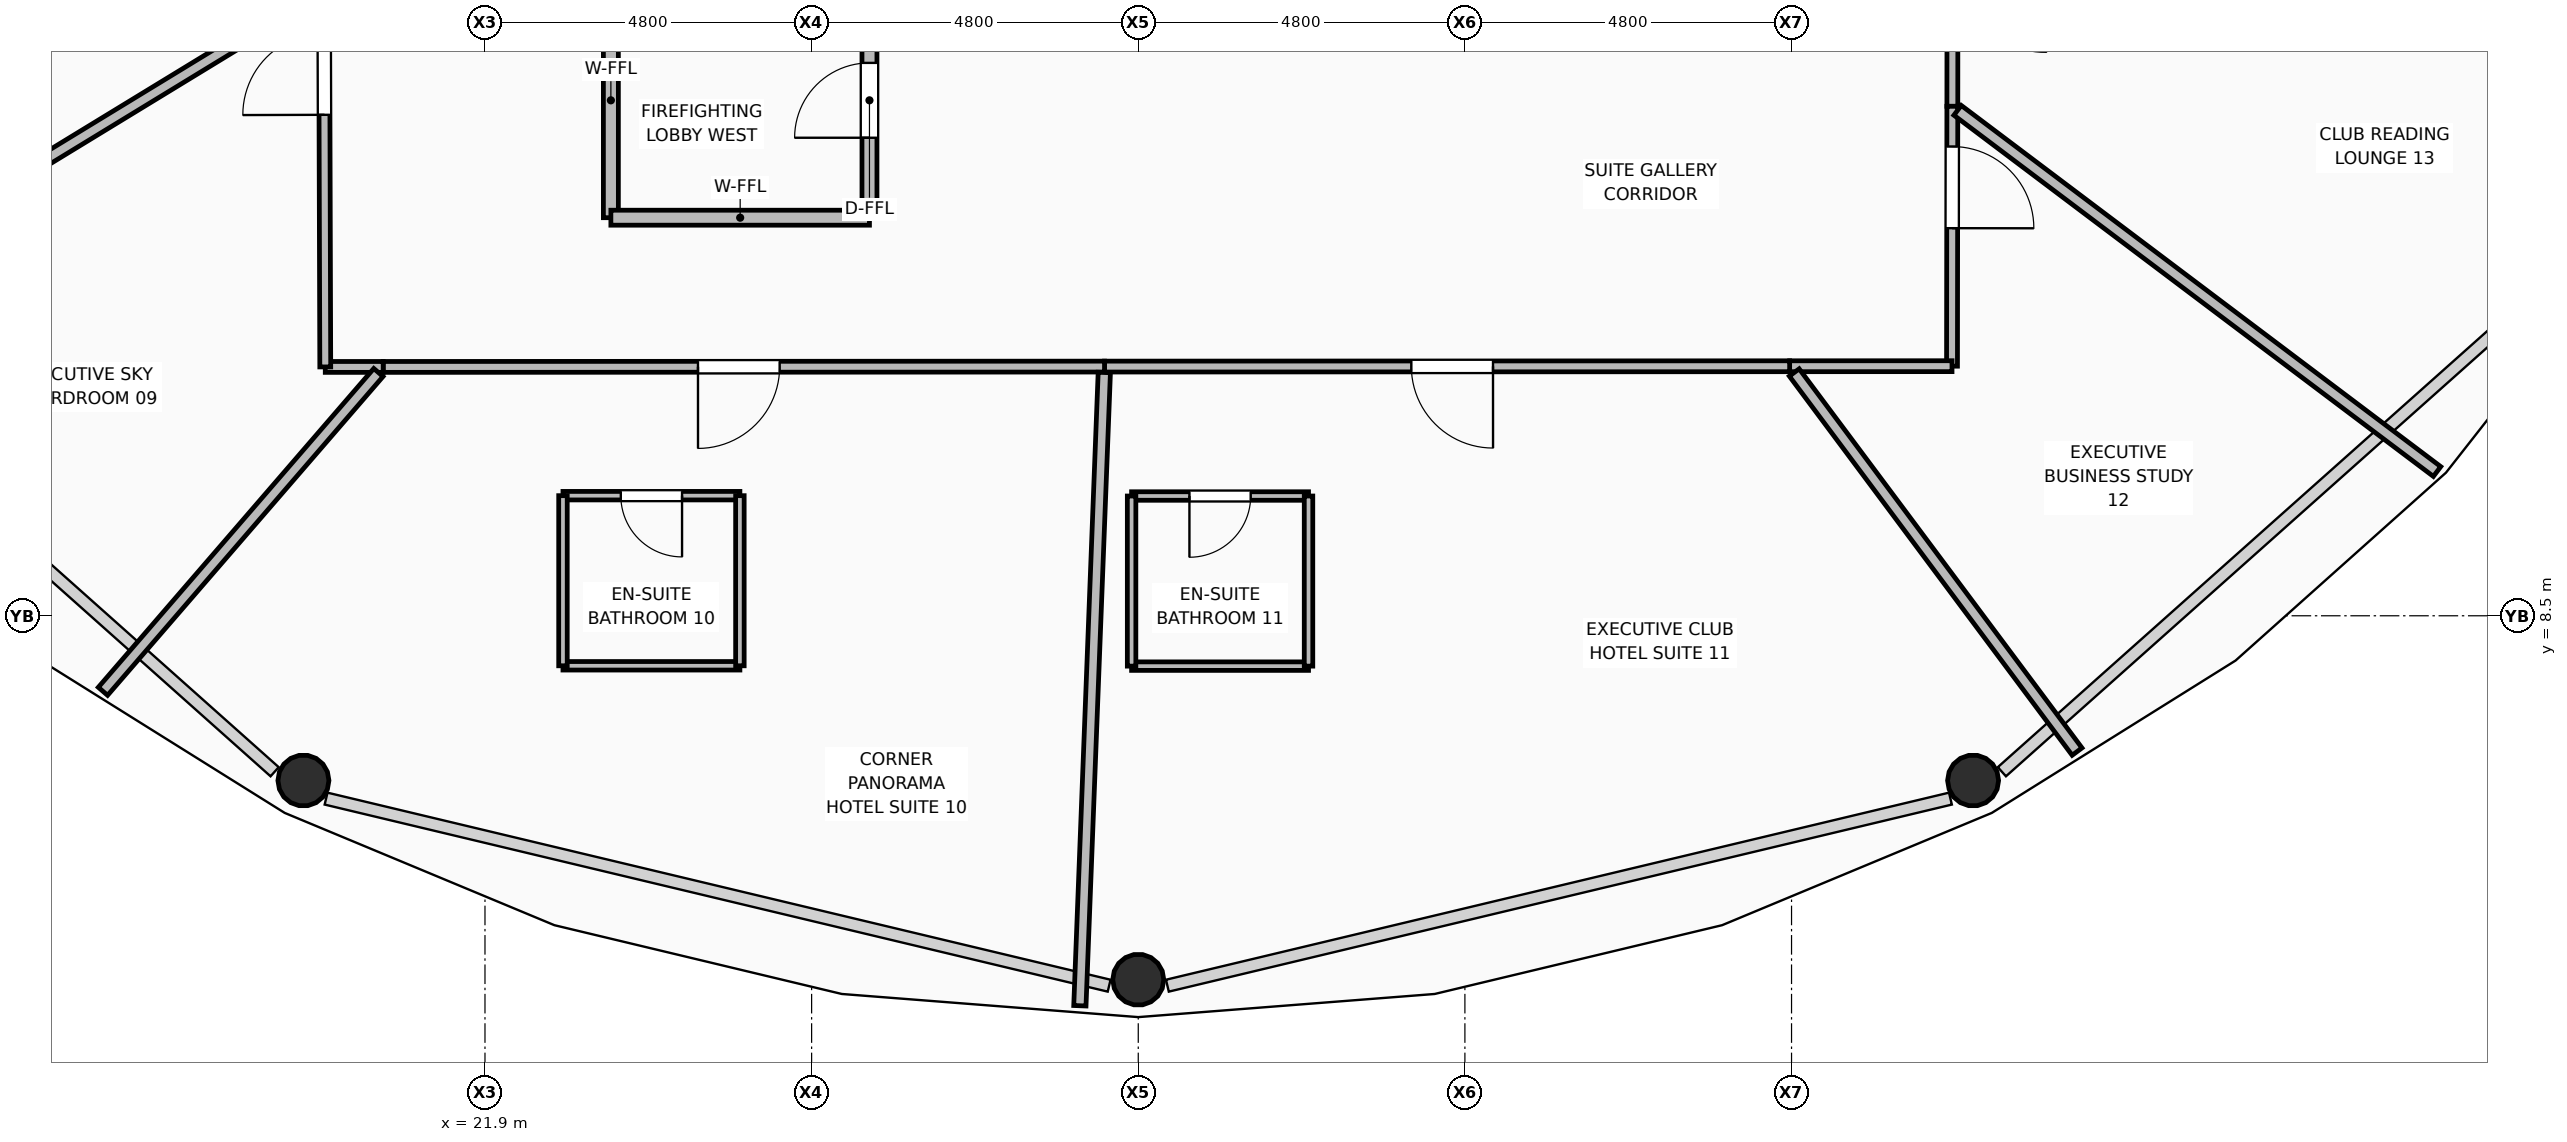
"""IFC4 building model, lengths in metres.
Left out: names, types, materials, properties, quantities, classifications, styles, units other than length and angle.
Written with IfcOpenShell. Run it as: python <this file> out.ifc"""

import sys

from ifc_helpers import new_model, si_unit, direction, frame, frame_2d, origin, origin_2d, place, context, subcontext, project, spatial, rectangle, hollow_circle, extrude, element, fill, save


model = new_model("IFC4")
c1 = context("Model", 3, precision=1e-05, world=origin(), true_north=direction((0.0, 1.0)))
c2 = subcontext(c1, "Body", "Model", "MODEL_VIEW")
j1 = project(units=[si_unit("LENGTHUNIT", "METRE"), si_unit("PLANEANGLEUNIT", "RADIAN")], contexts=[c1])
p1 = place(None, origin())
s1 = spatial("IfcSite", under=j1, at=p1, CompositionType="ELEMENT")
p2 = place(p1, origin())
s2 = spatial("IfcBuilding", under=s1, at=p2, CompositionType="ELEMENT")
p3 = place(p2, frame((0.0, 0.0, 168.45)))
s3 = spatial("IfcBuildingStorey", under=s2, at=p3, CompositionType="ELEMENT", Elevation=168.45)
for number, where, z_axis, x_axis in (
    (1, (19.232, 6.079, 0.0), (0.0, 0.0, 1.0), (1.0, 0.0, 0.0)),
    (2, (31.5, 3.152, 0.0), (0.0, 0.0, 1.0), (1.0, 0.0, 0.0)),
    (3, (43.768, 6.079, 0.0), (0.0, 0.0, 1.0), (1.0, 0.0, 0.0)),
):
    element("IfcColumn", number, at=place(p3, frame(where, z_axis=z_axis, x_axis=x_axis)), inside=s3, PredefinedType="COLUMN", context=c2, shape_type="SweptSolid", body=[
        extrude(hollow_circle(Radius=0.375, WallThickness=0.035, at=origin_2d()), origin(), (0.0, 0.0, 1.0), 3.57),
    ])
p4 = place(p3, frame((23.75, 14.35, 0.0), z_axis=(0.0, 0.0, 1.0), x_axis=(0.0, 1.0, 0.0)))
e4 = element("IfcWall", 4, at=p4, inside=s3, PredefinedType="PARTITIONING", context=c2, shape_type="SweptSolid", body=[
    extrude(rectangle(XDim=3.45, YDim=0.22, at=frame_2d((1.725, 0.0))), origin(), (0.0, 0.0, 1.0), 3.006),
])
p5 = place(p3, frame((23.75, 14.35, 0.0), z_axis=(0.0, 0.0, 1.0), x_axis=(1.0, 0.0, 0.0)))
e5 = element("IfcWall", 5, at=p5, inside=s3, PredefinedType="PARTITIONING", context=c2, shape_type="SweptSolid", body=[
    extrude(rectangle(XDim=3.8, YDim=0.22, at=frame_2d((1.9, 0.0))), origin(), (0.0, 0.0, 1.0), 3.55),
])
p6 = place(p3, frame((27.55, 14.35, 0.0), z_axis=(0.0, 0.0, 1.0), x_axis=(0.0, 1.0, 0.0)))
e6 = element("IfcWall", 6, at=p6, inside=s3, PredefinedType="PARTITIONING", context=c2, shape_type="SweptSolid", body=[
    extrude(rectangle(XDim=3.45, YDim=0.22, at=frame_2d((1.725, 0.0))), origin(), (0.0, 0.0, 1.0), 3.006),
])
p7 = place(p6, frame((1.175, 0.0, 0.0)))
e7 = element("IfcOpeningElement", 7, at=p7, cuts=e6, PredefinedType="OPENING", context=c2, shape_type="SweptSolid", body=[
    extrude(rectangle(XDim=1.1, YDim=2.1, at=frame_2d((0.55, 1.05))), frame((0.0, 0.12, 0.0), z_axis=(0.0, -1.0, 0.0), x_axis=(1.0, 0.0, 0.0)), (0.0, 0.0, 1.0), 0.24),
])
p8 = place(p3, frame((43.465, 17.96, 0.0), z_axis=(0.0, 0.0, 1.0), x_axis=(-0.001113722858, -0.999999379811, 0.0)))
e8 = element("IfcWall", 8, at=p8, inside=s3, PredefinedType="PARTITIONING", context=c2, shape_type="SweptSolid", body=[
    extrude(rectangle(XDim=1.973, YDim=0.16, at=frame_2d((0.986, 0.0))), origin(), (0.0, 0.0, 1.0), 3.006),
])
p9 = place(p3, frame((43.463, 15.987, 0.0), z_axis=(0.0, 0.0, 1.0), x_axis=(-0.001278526092, -0.999999182685, 0.0)))
e9 = element("IfcWall", 9, at=p9, inside=s3, PredefinedType="PARTITIONING", context=c2, shape_type="SweptSolid", body=[
    extrude(rectangle(XDim=3.819, YDim=0.16, at=frame_2d((1.91, 0.0))), origin(), (0.0, 0.0, 1.0), 3.55),
])
p10 = place(p9, frame((0.591, 0.0, 0.0)))
e10 = element("IfcOpeningElement", 10, at=p10, cuts=e9, PredefinedType="OPENING", context=c2, shape_type="SweptSolid", body=[
    extrude(rectangle(XDim=1.2, YDim=2.1, at=frame_2d((0.6, 1.05))), frame((0.0, 0.09, 0.0), z_axis=(0.0, -1.0, 0.0), x_axis=(1.0, 0.0, 0.0)), (0.0, 0.0, 1.0), 0.18),
])
p11 = place(p3, frame((43.458, 12.168, 0.0), z_axis=(0.0, 0.0, 1.0), x_axis=(-0.99999991624, -0.000409290869, 0.0)))
e11 = element("IfcWall", 11, at=p11, inside=s3, PredefinedType="PARTITIONING", context=c2, shape_type="SweptSolid", body=[
    extrude(rectangle(XDim=2.386, YDim=0.16, at=frame_2d((1.193, 0.0))), origin(), (0.0, 0.0, 1.0), 3.006),
])
p12 = place(p3, frame((41.072, 12.167, 0.0), z_axis=(0.0, 0.0, 1.0), x_axis=(-0.999999882398, -0.000484977755, 0.0)))
e12 = element("IfcWall", 12, at=p12, inside=s3, PredefinedType="PARTITIONING", context=c2, shape_type="SweptSolid", body=[
    extrude(rectangle(XDim=10.068, YDim=0.16, at=frame_2d((5.034, 0.0))), origin(), (0.0, 0.0, 1.0), 3.006),
])
p13 = place(p12, frame((4.359, 0.0, 0.0)))
e13 = element("IfcOpeningElement", 13, at=p13, cuts=e12, PredefinedType="OPENING", context=c2, shape_type="SweptSolid", body=[
    extrude(rectangle(XDim=1.2, YDim=2.1, at=frame_2d((0.6, 1.05))), frame((0.0, 0.09, 0.0), z_axis=(0.0, -1.0, 0.0), x_axis=(1.0, 0.0, 0.0)), (0.0, 0.0, 1.0), 0.18),
])
p14 = place(p3, frame((31.004, 12.162, 0.0), z_axis=(0.0, 0.0, 1.0), x_axis=(-0.999999883026, -0.000483681451, 0.0)))
e14 = element("IfcWall", 14, at=p14, inside=s3, PredefinedType="PARTITIONING", context=c2, shape_type="SweptSolid", body=[
    extrude(rectangle(XDim=10.6, YDim=0.16, at=frame_2d((5.3, 0.0))), origin(), (0.0, 0.0, 1.0), 3.006),
])
p15 = place(p14, frame((4.774, 0.0, 0.0)))
e15 = element("IfcOpeningElement", 15, at=p15, cuts=e14, PredefinedType="OPENING", context=c2, shape_type="SweptSolid", body=[
    extrude(rectangle(XDim=1.2, YDim=2.1, at=frame_2d((0.6, 1.05))), frame((0.0, 0.09, 0.0), z_axis=(0.0, -1.0, 0.0), x_axis=(1.0, 0.0, 0.0)), (0.0, 0.0, 1.0), 0.18),
])
p16 = place(p3, frame((20.404, 12.157, 0.0), z_axis=(0.0, 0.0, 1.0), x_axis=(-1.0, 0.0, 0.0)))
e16 = element("IfcWall", 16, at=p16, inside=s3, PredefinedType="PARTITIONING", context=c2, shape_type="SweptSolid", body=[
    extrude(rectangle(XDim=0.851, YDim=0.16, at=frame_2d((0.426, 0.0))), origin(), (0.0, 0.0, 1.0), 3.006),
])
p17 = place(p3, frame((19.553, 12.157, 0.0), z_axis=(0.0, 0.0, 1.0), x_axis=(-0.003113283747, 0.99999515372, 0.0)))
e17 = element("IfcWall", 17, at=p17, inside=s3, PredefinedType="PARTITIONING", context=c2, shape_type="SweptSolid", body=[
    extrude(rectangle(XDim=5.803, YDim=0.16, at=frame_2d((2.901, 0.0))), origin(), (0.0, 0.0, 1.0), 3.006),
])
p18 = place(p17, frame((3.705, 0.0, 0.0)))
e18 = element("IfcOpeningElement", 18, at=p18, cuts=e17, PredefinedType="OPENING", context=c2, shape_type="SweptSolid", body=[
    extrude(rectangle(XDim=1.2, YDim=2.1, at=frame_2d((0.6, 1.05))), frame((0.0, 0.09, 0.0), z_axis=(0.0, -1.0, 0.0), x_axis=(1.0, 0.0, 0.0)), (0.0, 0.0, 1.0), 0.18),
])
p19 = place(p3, frame((19.46, 17.656, 0.0), z_axis=(0.0, 0.0, 1.0), x_axis=(-0.853711993856, -0.520745457537, 0.0)))
e19 = element("IfcWall", 19, at=p19, inside=s3, PredefinedType="PARTITIONING", context=c2, shape_type="SweptSolid", body=[
    extrude(rectangle(XDim=9.968, YDim=0.18, at=frame_2d((4.984, 0.0))), origin(), (0.0, 0.0, 1.0), 2.852),
])
p20 = place(p3, frame((20.334, 12.075, 0.0), z_axis=(0.0, 0.0, 1.0), x_axis=(-0.653796426348, -0.756670491624, 0.0)))
e20 = element("IfcWall", 20, at=p20, inside=s3, PredefinedType="PARTITIONING", context=c2, shape_type="SweptSolid", body=[
    extrude(rectangle(XDim=6.192, YDim=0.18, at=frame_2d((3.096, 0.0))), origin(), (0.0, 0.0, 1.0), 2.852),
])
p21 = place(p3, frame((31.001, 12.075, 0.0), z_axis=(0.0, 0.0, 1.0), x_axis=(-0.038536822303, -0.999257180773, 0.0)))
e21 = element("IfcWall", 21, at=p21, inside=s3, PredefinedType="PARTITIONING", context=c2, shape_type="SweptSolid", body=[
    extrude(rectangle(XDim=9.313, YDim=0.18, at=frame_2d((4.656, 0.0))), origin(), (0.0, 0.0, 1.0), 2.852),
])
p22 = place(p3, frame((41.14, 12.075, 0.0), z_axis=(0.0, 0.0, 1.0), x_axis=(0.597946680124, -0.8015358805, 0.0)))
e22 = element("IfcWall", 22, at=p22, inside=s3, PredefinedType="PARTITIONING", context=c2, shape_type="SweptSolid", body=[
    extrude(rectangle(XDim=6.95, YDim=0.18, at=frame_2d((3.475, 0.0))), origin(), (0.0, 0.0, 1.0), 2.852),
])
p23 = place(p3, frame((43.54, 15.928, 0.0), z_axis=(0.0, 0.0, 1.0), x_axis=(0.798722893144, -0.601699044347, 0.0)))
e23 = element("IfcWall", 23, at=p23, inside=s3, PredefinedType="PARTITIONING", context=c2, shape_type="SweptSolid", body=[
    extrude(rectangle(XDim=8.822, YDim=0.18, at=frame_2d((4.411, 0.0))), origin(), (0.0, 0.0, 1.0), 2.852),
])
p24 = place(p3, frame((23.046, 7.765, 0.0), z_axis=(0.0, 0.0, 1.0), x_axis=(1.0, 0.0, 0.0)))
e24 = element("IfcWall", 24, at=p24, inside=s3, PredefinedType="PARTITIONING", context=c2, shape_type="SweptSolid", body=[
    extrude(rectangle(XDim=2.6, YDim=0.125, at=frame_2d((1.3, 0.0))), origin(), (0.0, 0.0, 1.0), 3.55),
])
p25 = place(p3, frame((23.046, 10.265, 0.0), z_axis=(0.0, 0.0, 1.0), x_axis=(1.0, 0.0, 0.0)))
e25 = element("IfcWall", 25, at=p25, inside=s3, PredefinedType="PARTITIONING", context=c2, shape_type="SweptSolid", body=[
    extrude(rectangle(XDim=2.6, YDim=0.125, at=frame_2d((1.3, 0.0))), origin(), (0.0, 0.0, 1.0), 3.55),
])
p26 = place(p25, frame((0.85, 0.0, 0.0)))
e26 = element("IfcOpeningElement", 26, at=p26, cuts=e25, PredefinedType="OPENING", context=c2, shape_type="SweptSolid", body=[
    extrude(rectangle(XDim=0.9, YDim=2.1, at=frame_2d((0.45, 1.05))), frame((0.0, 0.073, 0.0), z_axis=(0.0, -1.0, 0.0), x_axis=(1.0, 0.0, 0.0)), (0.0, 0.0, 1.0), 0.145),
])
for number, where, z_axis, x_axis in (
    (27, (23.046, 7.765, 0.0), (0.0, 0.0, 1.0), (0.0, 1.0, 0.0)),
    (28, (25.646, 7.765, 0.0), (0.0, 0.0, 1.0), (0.0, 1.0, 0.0)),
):
    element("IfcWall", number, at=place(p3, frame(where, z_axis=z_axis, x_axis=x_axis)), inside=s3, PredefinedType="PARTITIONING", context=c2, shape_type="SweptSolid", body=[
        extrude(rectangle(XDim=2.5, YDim=0.125, at=frame_2d((1.25, 0.0))), origin(), (0.0, 0.0, 1.0), 3.55),
    ])
p27 = place(p3, frame((31.402, 7.76, 0.0), z_axis=(0.0, 0.0, 1.0), x_axis=(1.0, 0.0, 0.0)))
e29 = element("IfcWall", 29, at=p27, inside=s3, PredefinedType="PARTITIONING", context=c2, shape_type="SweptSolid", body=[
    extrude(rectangle(XDim=2.6, YDim=0.125, at=frame_2d((1.3, 0.0))), origin(), (0.0, 0.0, 1.0), 3.006),
])
p28 = place(p3, frame((31.402, 10.26, 0.0), z_axis=(0.0, 0.0, 1.0), x_axis=(1.0, 0.0, 0.0)))
e30 = element("IfcWall", 30, at=p28, inside=s3, PredefinedType="PARTITIONING", context=c2, shape_type="SweptSolid", body=[
    extrude(rectangle(XDim=2.6, YDim=0.125, at=frame_2d((1.3, 0.0))), origin(), (0.0, 0.0, 1.0), 3.006),
])
p29 = place(p28, frame((0.85, 0.0, 0.0)))
e31 = element("IfcOpeningElement", 31, at=p29, cuts=e30, PredefinedType="OPENING", context=c2, shape_type="SweptSolid", body=[
    extrude(rectangle(XDim=0.9, YDim=2.1, at=frame_2d((0.45, 1.05))), frame((0.0, 0.073, 0.0), z_axis=(0.0, -1.0, 0.0), x_axis=(1.0, 0.0, 0.0)), (0.0, 0.0, 1.0), 0.145),
])
p30 = place(p3, frame((31.402, 7.76, 0.0), z_axis=(0.0, 0.0, 1.0), x_axis=(0.0, 1.0, 0.0)))
e32 = element("IfcWall", 32, at=p30, inside=s3, PredefinedType="PARTITIONING", context=c2, shape_type="SweptSolid", body=[
    extrude(rectangle(XDim=2.5, YDim=0.125, at=frame_2d((1.25, 0.0))), origin(), (0.0, 0.0, 1.0), 3.006),
])
p31 = place(p3, frame((34.002, 7.76, 0.0), z_axis=(0.0, 0.0, 1.0), x_axis=(0.0, 1.0, 0.0)))
e33 = element("IfcWall", 33, at=p31, inside=s3, PredefinedType="PARTITIONING", context=c2, shape_type="SweptSolid", body=[
    extrude(rectangle(XDim=2.5, YDim=0.125, at=frame_2d((1.25, 0.0))), origin(), (0.0, 0.0, 1.0), 3.55),
])
p32 = place(p7, origin())
e34 = element("IfcDoor", 34, at=p32, inside=s3, OperationType="SINGLE_SWING_LEFT", PredefinedType="DOOR", context=c2, shape_type="SweptSolid", body=[
    extrude(rectangle(XDim=1.1, YDim=2.1, at=frame_2d((0.55, 1.05))), frame((0.0, 0.025, 0.0), z_axis=(0.0, -1.0, 0.0), x_axis=(1.0, 0.0, 0.0)), (0.0, 0.0, 1.0), 0.05),
])
fill(e7, e34)
p33 = place(p18, origin())
e35 = element("IfcDoor", 35, at=p33, inside=s3, OperationType="SINGLE_SWING_LEFT", PredefinedType="DOOR", context=c2, shape_type="SweptSolid", body=[
    extrude(rectangle(XDim=1.2, YDim=2.1, at=frame_2d((0.6, 1.05))), frame((0.0, 0.025, 0.0), z_axis=(0.0, -1.0, 0.0), x_axis=(1.0, 0.0, 0.0)), (0.0, 0.0, 1.0), 0.05),
])
fill(e18, e35)
p34 = place(p26, frame((0.9, 0.0, 0.0), z_axis=(0.0, 0.0, 1.0), x_axis=(-1.0, 0.0, 0.0)))
e36 = element("IfcDoor", 36, at=p34, inside=s3, OperationType="SINGLE_SWING_LEFT", PredefinedType="DOOR", context=c2, shape_type="SweptSolid", body=[
    extrude(rectangle(XDim=0.9, YDim=2.1, at=frame_2d((0.45, 1.05))), frame((0.0, 0.025, 0.0), z_axis=(0.0, -1.0, 0.0), x_axis=(1.0, 0.0, 0.0)), (0.0, 0.0, 1.0), 0.05),
])
fill(e26, e36)
p35 = place(p15, origin())
e37 = element("IfcDoor", 37, at=p35, inside=s3, OperationType="SINGLE_SWING_RIGHT", PredefinedType="DOOR", context=c2, shape_type="SweptSolid", body=[
    extrude(rectangle(XDim=1.2, YDim=2.1, at=frame_2d((0.6, 1.05))), frame((0.0, 0.025, 0.0), z_axis=(0.0, -1.0, 0.0), x_axis=(1.0, 0.0, 0.0)), (0.0, 0.0, 1.0), 0.05),
])
fill(e15, e37)
p36 = place(p29, frame((0.9, 0.0, 0.0), z_axis=(0.0, 0.0, 1.0), x_axis=(-1.0, 0.0, 0.0)))
e38 = element("IfcDoor", 38, at=p36, inside=s3, OperationType="SINGLE_SWING_RIGHT", PredefinedType="DOOR", context=c2, shape_type="SweptSolid", body=[
    extrude(rectangle(XDim=0.9, YDim=2.1, at=frame_2d((0.45, 1.05))), frame((0.0, 0.025, 0.0), z_axis=(0.0, -1.0, 0.0), x_axis=(1.0, 0.0, 0.0)), (0.0, 0.0, 1.0), 0.05),
])
fill(e31, e38)
p37 = place(p13, origin())
e39 = element("IfcDoor", 39, at=p37, inside=s3, OperationType="SINGLE_SWING_LEFT", PredefinedType="DOOR", context=c2, shape_type="SweptSolid", body=[
    extrude(rectangle(XDim=1.2, YDim=2.1, at=frame_2d((0.6, 1.05))), frame((0.0, 0.025, 0.0), z_axis=(0.0, -1.0, 0.0), x_axis=(1.0, 0.0, 0.0)), (0.0, 0.0, 1.0), 0.05),
])
fill(e13, e39)
p38 = place(p10, origin())
e40 = element("IfcDoor", 40, at=p38, inside=s3, OperationType="SINGLE_SWING_RIGHT", PredefinedType="DOOR", context=c2, shape_type="SweptSolid", body=[
    extrude(rectangle(XDim=1.2, YDim=2.1, at=frame_2d((0.6, 1.05))), frame((0.0, 0.025, 0.0), z_axis=(0.0, -1.0, 0.0), x_axis=(1.0, 0.0, 0.0)), (0.0, 0.0, 1.0), 0.05),
])
fill(e10, e40)
save(model, sys.argv[1])
